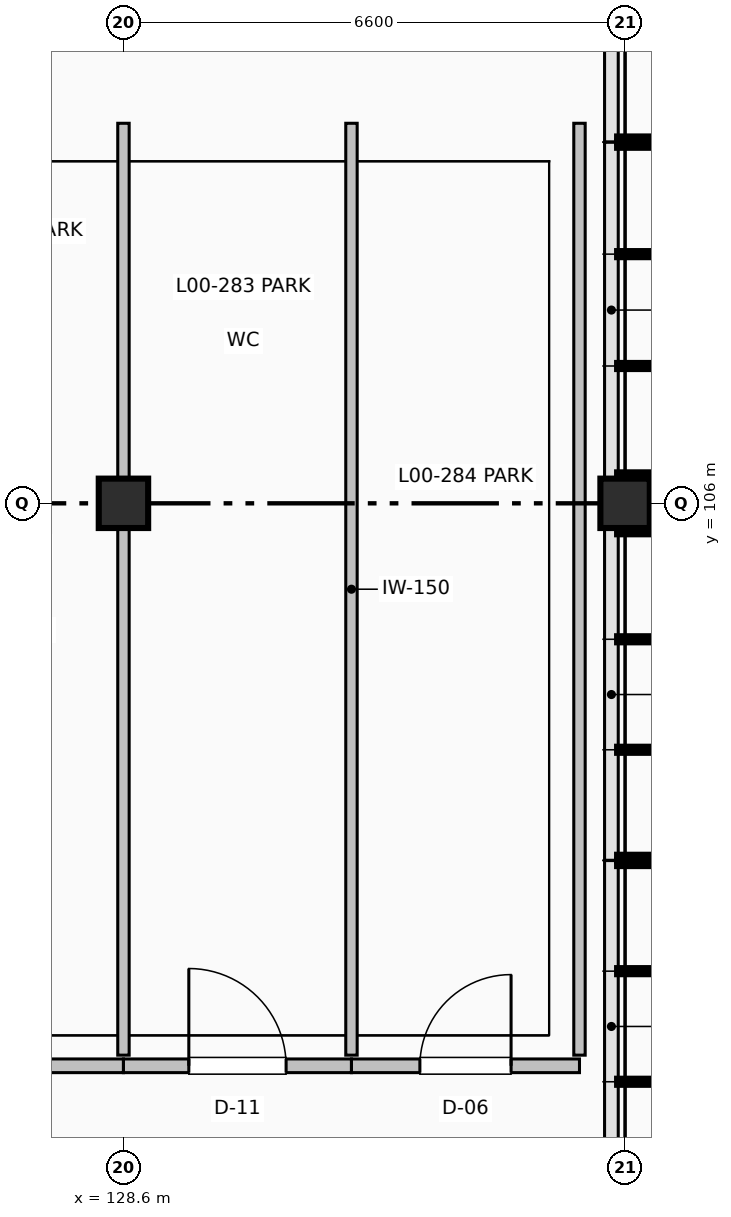
"""IFC4 building model, lengths in metres.
Left out: names, types, materials, properties, quantities, classifications, styles, units other than length and angle.
Written with IfcOpenShell. Run it as: python <this file> out.ifc"""

import sys

from ifc_helpers import new_model, si_unit, direction, frame, frame_2d, origin, origin_2d, place, context, subcontext, project, spatial, rectangle, extrude, element, fill, save


model = new_model("IFC4")
c1 = context("Model", 3, precision=1e-05, world=origin(), true_north=direction((0.0, 1.0)))
c2 = subcontext(c1, "Body", "Model", "MODEL_VIEW")
j1 = project(units=[si_unit("LENGTHUNIT", "METRE"), si_unit("PLANEANGLEUNIT", "RADIAN")], contexts=[c1])
p1 = place(None, origin())
s1 = spatial("IfcSite", under=j1, at=p1, CompositionType="ELEMENT")
p2 = place(p1, origin())
s2 = spatial("IfcBuilding", under=s1, at=p2, CompositionType="ELEMENT")
p3 = place(p2, origin())
s3 = spatial("IfcBuildingStorey", under=s2, at=p3, CompositionType="ELEMENT", Elevation=0.0)
for number, where, z_axis, x_axis in (
    (1, (128.6, 106.0, 0.0), (0.0, 0.0, 1.0), (1.0, 0.0, 0.0)),
    (2, (135.2, 106.0, 0.0), (0.0, 0.0, 1.0), (1.0, 0.0, 0.0)),
):
    element("IfcColumn", number, at=place(p3, frame(where, z_axis=z_axis, x_axis=x_axis)), inside=s3, PredefinedType="COLUMN", context=c2, shape_type="SweptSolid", body=[
        extrude(rectangle(XDim=0.65, YDim=0.65, at=origin_2d()), origin(), (0.0, 0.0, 1.0), 5.4),
    ])
p4 = place(p3, frame((125.6, 98.6, 0.0), z_axis=(0.0, 0.0, 1.0), x_axis=(1.0, 0.0, 0.0)))
e3 = element("IfcWall", 3, at=p4, inside=s3, PredefinedType="PARTITIONING", context=c2, shape_type="SweptSolid", body=[
    extrude(rectangle(XDim=3.0, YDim=0.18, at=frame_2d((1.5, 0.0))), origin(), (0.0, 0.0, 1.0), 5.092),
])
p5 = place(p4, frame((0.975, 0.0, 0.0)))
e4 = element("IfcOpeningElement", 4, at=p5, cuts=e3, PredefinedType="OPENING", context=c2, shape_type="SweptSolid", body=[
    extrude(rectangle(XDim=1.05, YDim=2.1, at=frame_2d((0.525, 1.05))), frame((0.0, 0.1, 0.0), z_axis=(0.0, -1.0, 0.0), x_axis=(1.0, 0.0, 0.0)), (0.0, 0.0, 1.0), 0.2),
])
p6 = place(p3, frame((128.6, 98.74, 0.0), z_axis=(0.0, 0.0, 1.0), x_axis=(0.0, 1.0, 0.0)))
e5 = element("IfcWall", 5, at=p6, inside=s3, PredefinedType="PARTITIONING", context=c2, shape_type="SweptSolid", body=[
    extrude(rectangle(XDim=6.935, YDim=0.15, at=frame_2d((3.468, 0.0))), origin(), (0.0, 0.0, 1.0), 4.192),
])
p7 = place(p3, frame((128.6, 106.325, 0.0), z_axis=(0.0, 0.0, 1.0), x_axis=(0.0, 1.0, 0.0)))
e6 = element("IfcWall", 6, at=p7, inside=s3, PredefinedType="PARTITIONING", context=c2, shape_type="SweptSolid", body=[
    extrude(rectangle(XDim=4.675, YDim=0.15, at=frame_2d((2.337, 0.0))), origin(), (0.0, 0.0, 1.0), 4.192),
])
p8 = place(p3, frame((128.6, 98.6, 0.0), z_axis=(0.0, 0.0, 1.0), x_axis=(1.0, 0.0, 0.0)))
e7 = element("IfcWall", 7, at=p8, inside=s3, PredefinedType="PARTITIONING", context=c2, shape_type="SweptSolid", body=[
    extrude(rectangle(XDim=3.0, YDim=0.18, at=frame_2d((1.5, 0.0))), origin(), (0.0, 0.0, 1.0), 5.092),
])
p9 = place(p8, frame((0.86, 0.0, 0.0)))
e8 = element("IfcOpeningElement", 8, at=p9, cuts=e7, PredefinedType="OPENING", context=c2, shape_type="SweptSolid", body=[
    extrude(rectangle(XDim=1.28, YDim=2.14, at=frame_2d((0.64, 1.07))), frame((0.0, 0.1, 0.0), z_axis=(0.0, -1.0, 0.0), x_axis=(1.0, 0.0, 0.0)), (0.0, 0.0, 1.0), 0.2),
])
for number, where, z_axis, x_axis in (
    (9, (131.6, 98.74, 0.0), (0.0, 0.0, 1.0), (0.0, 1.0, 0.0)),
    (10, (134.6, 98.74, 0.0), (0.0, 0.0, 1.0), (0.0, 1.0, 0.0)),
):
    element("IfcWall", number, at=place(p3, frame(where, z_axis=z_axis, x_axis=x_axis)), inside=s3, PredefinedType="PARTITIONING", context=c2, shape_type="SweptSolid", body=[
        extrude(rectangle(XDim=12.26, YDim=0.15, at=frame_2d((6.13, 0.0))), origin(), (0.0, 0.0, 1.0), 5.092),
    ])
p10 = place(p3, frame((131.6, 98.6, 0.0), z_axis=(0.0, 0.0, 1.0), x_axis=(1.0, 0.0, 0.0)))
e11 = element("IfcWall", 11, at=p10, inside=s3, PredefinedType="PARTITIONING", context=c2, shape_type="SweptSolid", body=[
    extrude(rectangle(XDim=3.0, YDim=0.18, at=frame_2d((1.5, 0.0))), origin(), (0.0, 0.0, 1.0), 5.092),
])
p11 = place(p10, frame((0.9, 0.0, 0.0)))
e12 = element("IfcOpeningElement", 12, at=p11, cuts=e11, PredefinedType="OPENING", context=c2, shape_type="SweptSolid", body=[
    extrude(rectangle(XDim=1.2, YDim=2.1, at=frame_2d((0.6, 1.05))), frame((0.0, 0.1, 0.0), z_axis=(0.0, -1.0, 0.0), x_axis=(1.0, 0.0, 0.0)), (0.0, 0.0, 1.0), 0.2),
])
p12 = place(p9, origin())
e13 = element("IfcDoor", 13, at=p12, inside=s3, OperationType="SINGLE_SWING_LEFT", PredefinedType="DOOR", context=c2, shape_type="SweptSolid", body=[
    extrude(rectangle(XDim=1.28, YDim=2.14, at=frame_2d((0.64, 1.07))), frame((0.0, 0.025, 0.0), z_axis=(0.0, -1.0, 0.0), x_axis=(1.0, 0.0, 0.0)), (0.0, 0.0, 1.0), 0.05),
])
fill(e8, e13)
p13 = place(p11, origin())
e14 = element("IfcDoor", 14, at=p13, inside=s3, OperationType="SINGLE_SWING_RIGHT", PredefinedType="DOOR", context=c2, shape_type="SweptSolid", body=[
    extrude(rectangle(XDim=1.2, YDim=2.1, at=frame_2d((0.6, 1.05))), frame((0.0, 0.025, 0.0), z_axis=(0.0, -1.0, 0.0), x_axis=(1.0, 0.0, 0.0)), (0.0, 0.0, 1.0), 0.05),
])
fill(e12, e14)
save(model, sys.argv[1])
